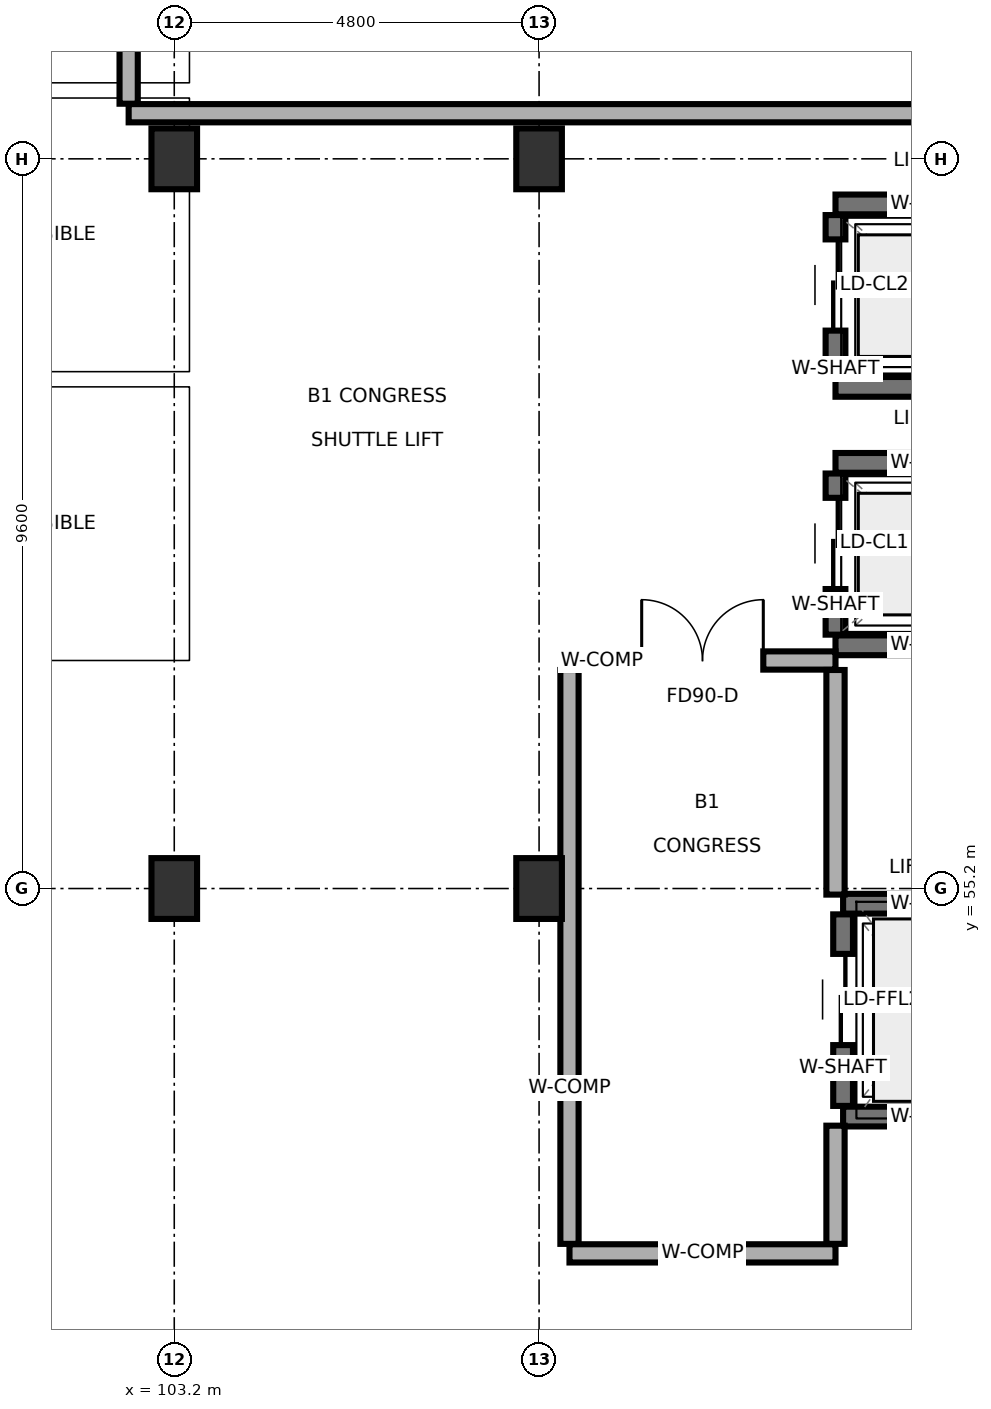
"""IFC4 building model, lengths in metres.
Left out: names, types, materials, properties, quantities, classifications, styles, units other than length and angle.
Written with IfcOpenShell. Run it as: python <this file> out.ifc"""

import sys

from ifc_helpers import new_model, si_unit, direction, frame, frame_2d, origin, origin_2d, place, context, subcontext, project, spatial, rectangle, extrude, element, fill, save


model = new_model("IFC4")
c1 = context("Model", 3, precision=1e-05, world=origin(), true_north=direction((0.0, 1.0)))
c2 = subcontext(c1, "Body", "Model", "MODEL_VIEW")
j1 = project(units=[si_unit("LENGTHUNIT", "METRE"), si_unit("PLANEANGLEUNIT", "RADIAN")], contexts=[c1])
p1 = place(None, origin())
s1 = spatial("IfcSite", under=j1, at=p1, CompositionType="ELEMENT")
p2 = place(p1, origin())
s2 = spatial("IfcBuilding", under=s1, at=p2, CompositionType="ELEMENT")
p3 = place(p2, frame((0.0, 0.0, -4.2)))
s3 = spatial("IfcBuildingStorey", under=s2, at=p3, CompositionType="ELEMENT", Elevation=-4.2)
for number, where, z_axis, x_axis in (
    (1, (103.2, 55.2, 0.0), (0.0, 0.0, 1.0), (1.0, 0.0, 0.0)),
    (2, (103.2, 64.8, 0.0), (0.0, 0.0, 1.0), (1.0, 0.0, 0.0)),
    (3, (108.0, 55.2, 0.0), (0.0, 0.0, 1.0), (1.0, 0.0, 0.0)),
    (4, (108.0, 64.8, 0.0), (0.0, 0.0, 1.0), (1.0, 0.0, 0.0)),
):
    element("IfcColumn", number, at=place(p3, frame(where, z_axis=z_axis, x_axis=x_axis)), inside=s3, PredefinedType="COLUMN", context=c2, shape_type="SweptSolid", body=[
        extrude(rectangle(XDim=0.6, YDim=0.8, at=origin_2d()), origin(), (0.0, 0.0, 1.0), 4.2),
    ])
for number, where, z_axis, x_axis in (
    (5, (112.0, 52.2, 0.0), (0.0, 0.0, 1.0), (1.0, 0.0, 0.0)),
    (6, (112.0, 55.0, 0.0), (0.0, 0.0, 1.0), (1.0, 0.0, 0.0)),
):
    element("IfcWall", number, at=place(p3, frame(where, z_axis=z_axis, x_axis=x_axis)), inside=s3, PredefinedType="SHEAR", context=c2, shape_type="SweptSolid", body=[
        extrude(rectangle(XDim=2.4, YDim=0.26, at=frame_2d((1.2, 0.0))), origin(), (0.0, 0.0, 1.0), 3.325),
    ])
p4 = place(p3, frame((112.0, 52.34, 0.0), z_axis=(0.0, 0.0, 1.0), x_axis=(0.0, 1.0, 0.0)))
e7 = element("IfcWall", 7, at=p4, inside=s3, PredefinedType="SHEAR", context=c2, shape_type="SweptSolid", body=[
    extrude(rectangle(XDim=2.52, YDim=0.26, at=frame_2d((1.26, 0.0))), origin(), (0.0, 0.0, 1.0), 3.325),
])
p5 = place(p4, frame((0.8, 0.0, 0.0)))
e8 = element("IfcOpeningElement", 8, at=p5, cuts=e7, PredefinedType="OPENING", context=c2, shape_type="SweptSolid", body=[
    extrude(rectangle(XDim=1.2, YDim=2.2, at=frame_2d((0.6, 1.1))), frame((0.0, 0.14, 0.0), z_axis=(0.0, -1.0, 0.0), x_axis=(1.0, 0.0, 0.0)), (0.0, 0.0, 1.0), 0.28),
])
for number, where, z_axis, x_axis in (
    (9, (111.9, 58.4, 0.0), (0.0, 0.0, 1.0), (1.0, 0.0, 0.0)),
    (10, (111.9, 60.8, 0.0), (0.0, 0.0, 1.0), (1.0, 0.0, 0.0)),
):
    element("IfcWall", number, at=place(p3, frame(where, z_axis=z_axis, x_axis=x_axis)), inside=s3, PredefinedType="SHEAR", context=c2, shape_type="SweptSolid", body=[
        extrude(rectangle(XDim=2.6, YDim=0.26, at=frame_2d((1.3, 0.0))), origin(), (0.0, 0.0, 1.0), 3.88),
    ])
p6 = place(p3, frame((111.9, 58.54, 0.0), z_axis=(0.0, 0.0, 1.0), x_axis=(0.0, 1.0, 0.0)))
e11 = element("IfcWall", 11, at=p6, inside=s3, PredefinedType="SHEAR", context=c2, shape_type="SweptSolid", body=[
    extrude(rectangle(XDim=2.12, YDim=0.26, at=frame_2d((1.06, 0.0))), origin(), (0.0, 0.0, 1.0), 3.88),
])
p7 = place(p6, frame((0.6, 0.0, 0.0)))
e12 = element("IfcOpeningElement", 12, at=p7, cuts=e11, PredefinedType="OPENING", context=c2, shape_type="SweptSolid", body=[
    extrude(rectangle(XDim=1.2, YDim=2.2, at=frame_2d((0.6, 1.1))), frame((0.0, 0.14, 0.0), z_axis=(0.0, -1.0, 0.0), x_axis=(1.0, 0.0, 0.0)), (0.0, 0.0, 1.0), 0.28),
])
for number, where, z_axis, x_axis in (
    (13, (111.9, 61.8, 0.0), (0.0, 0.0, 1.0), (1.0, 0.0, 0.0)),
    (14, (111.9, 64.2, 0.0), (0.0, 0.0, 1.0), (1.0, 0.0, 0.0)),
):
    element("IfcWall", number, at=place(p3, frame(where, z_axis=z_axis, x_axis=x_axis)), inside=s3, PredefinedType="SHEAR", context=c2, shape_type="SweptSolid", body=[
        extrude(rectangle(XDim=2.6, YDim=0.26, at=frame_2d((1.3, 0.0))), origin(), (0.0, 0.0, 1.0), 3.88),
    ])
p8 = place(p3, frame((111.9, 61.94, 0.0), z_axis=(0.0, 0.0, 1.0), x_axis=(0.0, 1.0, 0.0)))
e15 = element("IfcWall", 15, at=p8, inside=s3, PredefinedType="SHEAR", context=c2, shape_type="SweptSolid", body=[
    extrude(rectangle(XDim=2.12, YDim=0.26, at=frame_2d((1.06, 0.0))), origin(), (0.0, 0.0, 1.0), 3.88),
])
p9 = place(p8, frame((0.6, 0.0, 0.0)))
e16 = element("IfcOpeningElement", 16, at=p9, cuts=e15, PredefinedType="OPENING", context=c2, shape_type="SweptSolid", body=[
    extrude(rectangle(XDim=1.2, YDim=2.2, at=frame_2d((0.6, 1.1))), frame((0.0, 0.14, 0.0), z_axis=(0.0, -1.0, 0.0), x_axis=(1.0, 0.0, 0.0)), (0.0, 0.0, 1.0), 0.28),
])
p10 = place(p3, frame((108.4, 50.4, 0.0), z_axis=(0.0, 0.0, 1.0), x_axis=(1.0, 0.0, 0.0)))
e17 = element("IfcWall", 17, at=p10, inside=s3, PredefinedType="SOLIDWALL", context=c2, shape_type="SweptSolid", body=[
    extrude(rectangle(XDim=3.5, YDim=0.24, at=frame_2d((1.75, 0.0))), origin(), (0.0, 0.0, 1.0), 3.88),
])
p11 = place(p3, frame((108.4, 50.525, 0.0), z_axis=(0.0, 0.0, 1.0), x_axis=(0.0, 1.0, 0.0)))
e18 = element("IfcWall", 18, at=p11, inside=s3, PredefinedType="SOLIDWALL", context=c2, shape_type="SweptSolid", body=[
    extrude(rectangle(XDim=7.55, YDim=0.24, at=frame_2d((3.775, 0.0))), origin(), (0.0, 0.0, 1.0), 3.325),
])
p12 = place(p3, frame((108.4, 58.2, 0.0), z_axis=(0.0, 0.0, 1.0), x_axis=(1.0, 0.0, 0.0)))
e19 = element("IfcWall", 19, at=p12, inside=s3, PredefinedType="SOLIDWALL", context=c2, shape_type="SweptSolid", body=[
    extrude(rectangle(XDim=3.5, YDim=0.24, at=frame_2d((1.75, 0.0))), origin(), (0.0, 0.0, 1.0), 3.88),
])
p13 = place(p12, frame((0.95, 0.0, 0.0)))
e20 = element("IfcOpeningElement", 20, at=p13, cuts=e19, PredefinedType="OPENING", context=c2, shape_type="SweptSolid", body=[
    extrude(rectangle(XDim=1.6, YDim=2.2, at=frame_2d((0.8, 1.1))), frame((0.0, 0.13, 0.0), z_axis=(0.0, -1.0, 0.0), x_axis=(1.0, 0.0, 0.0)), (0.0, 0.0, 1.0), 0.26),
])
p14 = place(p3, frame((111.9, 50.525, 0.0), z_axis=(0.0, 0.0, 1.0), x_axis=(0.0, 1.0, 0.0)))
e21 = element("IfcWall", 21, at=p14, inside=s3, PredefinedType="SOLIDWALL", context=c2, shape_type="SweptSolid", body=[
    extrude(rectangle(XDim=1.555, YDim=0.24, at=frame_2d((0.778, 0.0))), origin(), (0.0, 0.0, 1.0), 3.88),
])
p15 = place(p3, frame((111.9, 55.12, 0.0), z_axis=(0.0, 0.0, 1.0), x_axis=(0.0, 1.0, 0.0)))
e22 = element("IfcWall", 22, at=p15, inside=s3, PredefinedType="SOLIDWALL", context=c2, shape_type="SweptSolid", body=[
    extrude(rectangle(XDim=2.955, YDim=0.24, at=frame_2d((1.478, 0.0))), origin(), (0.0, 0.0, 1.0), 3.325),
])
p16 = place(p3, frame((102.6, 65.4, 0.0), z_axis=(0.0, 0.0, 1.0), x_axis=(1.0, 0.0, 0.0)))
e23 = element("IfcWall", 23, at=p16, inside=s3, PredefinedType="SOLIDWALL", context=c2, shape_type="SweptSolid", body=[
    extrude(rectangle(XDim=14.75, YDim=0.24, at=frame_2d((7.375, 0.0))), origin(), (0.0, 0.0, 1.0), 3.315),
])
p17 = place(p3, frame((102.6, 65.525, 0.0), z_axis=(0.0, 0.0, 1.0), x_axis=(0.0, 1.0, 0.0)))
e24 = element("IfcWall", 24, at=p17, inside=s3, PredefinedType="SOLIDWALL", context=c2, shape_type="SweptSolid", body=[
    extrude(rectangle(XDim=12.15, YDim=0.24, at=frame_2d((6.075, 0.0))), origin(), (0.0, 0.0, 1.0), 3.88),
])
p18 = place(p17, frame((5.425, 0.0, 0.0)))
e25 = element("IfcOpeningElement", 25, at=p18, cuts=e24, PredefinedType="OPENING", context=c2, shape_type="SweptSolid", body=[
    extrude(rectangle(XDim=1.3, YDim=2.2, at=frame_2d((0.65, 1.1))), frame((0.0, 0.13, 0.0), z_axis=(0.0, -1.0, 0.0), x_axis=(1.0, 0.0, 0.0)), (0.0, 0.0, 1.0), 0.26),
])
p19 = place(p5, origin())
e26 = element("IfcDoor", 26, at=p19, inside=s3, OperationType="SLIDING_TO_LEFT", PredefinedType="DOOR", context=c2, shape_type="SweptSolid", body=[
    extrude(rectangle(XDim=1.2, YDim=2.2, at=frame_2d((0.6, 1.1))), frame((0.0, 0.025, 0.0), z_axis=(0.0, -1.0, 0.0), x_axis=(1.0, 0.0, 0.0)), (0.0, 0.0, 1.0), 0.05),
])
fill(e8, e26)
p20 = place(p7, origin())
e27 = element("IfcDoor", 27, at=p20, inside=s3, OperationType="SLIDING_TO_RIGHT", PredefinedType="DOOR", context=c2, shape_type="SweptSolid", body=[
    extrude(rectangle(XDim=1.2, YDim=2.2, at=frame_2d((0.6, 1.1))), frame((0.0, 0.025, 0.0), z_axis=(0.0, -1.0, 0.0), x_axis=(1.0, 0.0, 0.0)), (0.0, 0.0, 1.0), 0.05),
])
fill(e12, e27)
p21 = place(p9, origin())
e28 = element("IfcDoor", 28, at=p21, inside=s3, OperationType="SLIDING_TO_LEFT", PredefinedType="DOOR", context=c2, shape_type="SweptSolid", body=[
    extrude(rectangle(XDim=1.2, YDim=2.2, at=frame_2d((0.6, 1.1))), frame((0.0, 0.025, 0.0), z_axis=(0.0, -1.0, 0.0), x_axis=(1.0, 0.0, 0.0)), (0.0, 0.0, 1.0), 0.05),
])
fill(e16, e28)
p22 = place(p13, origin())
e29 = element("IfcDoor", 29, at=p22, inside=s3, OperationType="DOUBLE_DOOR_SINGLE_SWING", PredefinedType="DOOR", context=c2, shape_type="SweptSolid", body=[
    extrude(rectangle(XDim=1.6, YDim=2.2, at=frame_2d((0.8, 1.1))), frame((0.0, 0.025, 0.0), z_axis=(0.0, -1.0, 0.0), x_axis=(1.0, 0.0, 0.0)), (0.0, 0.0, 1.0), 0.05),
])
fill(e20, e29)
save(model, sys.argv[1])
